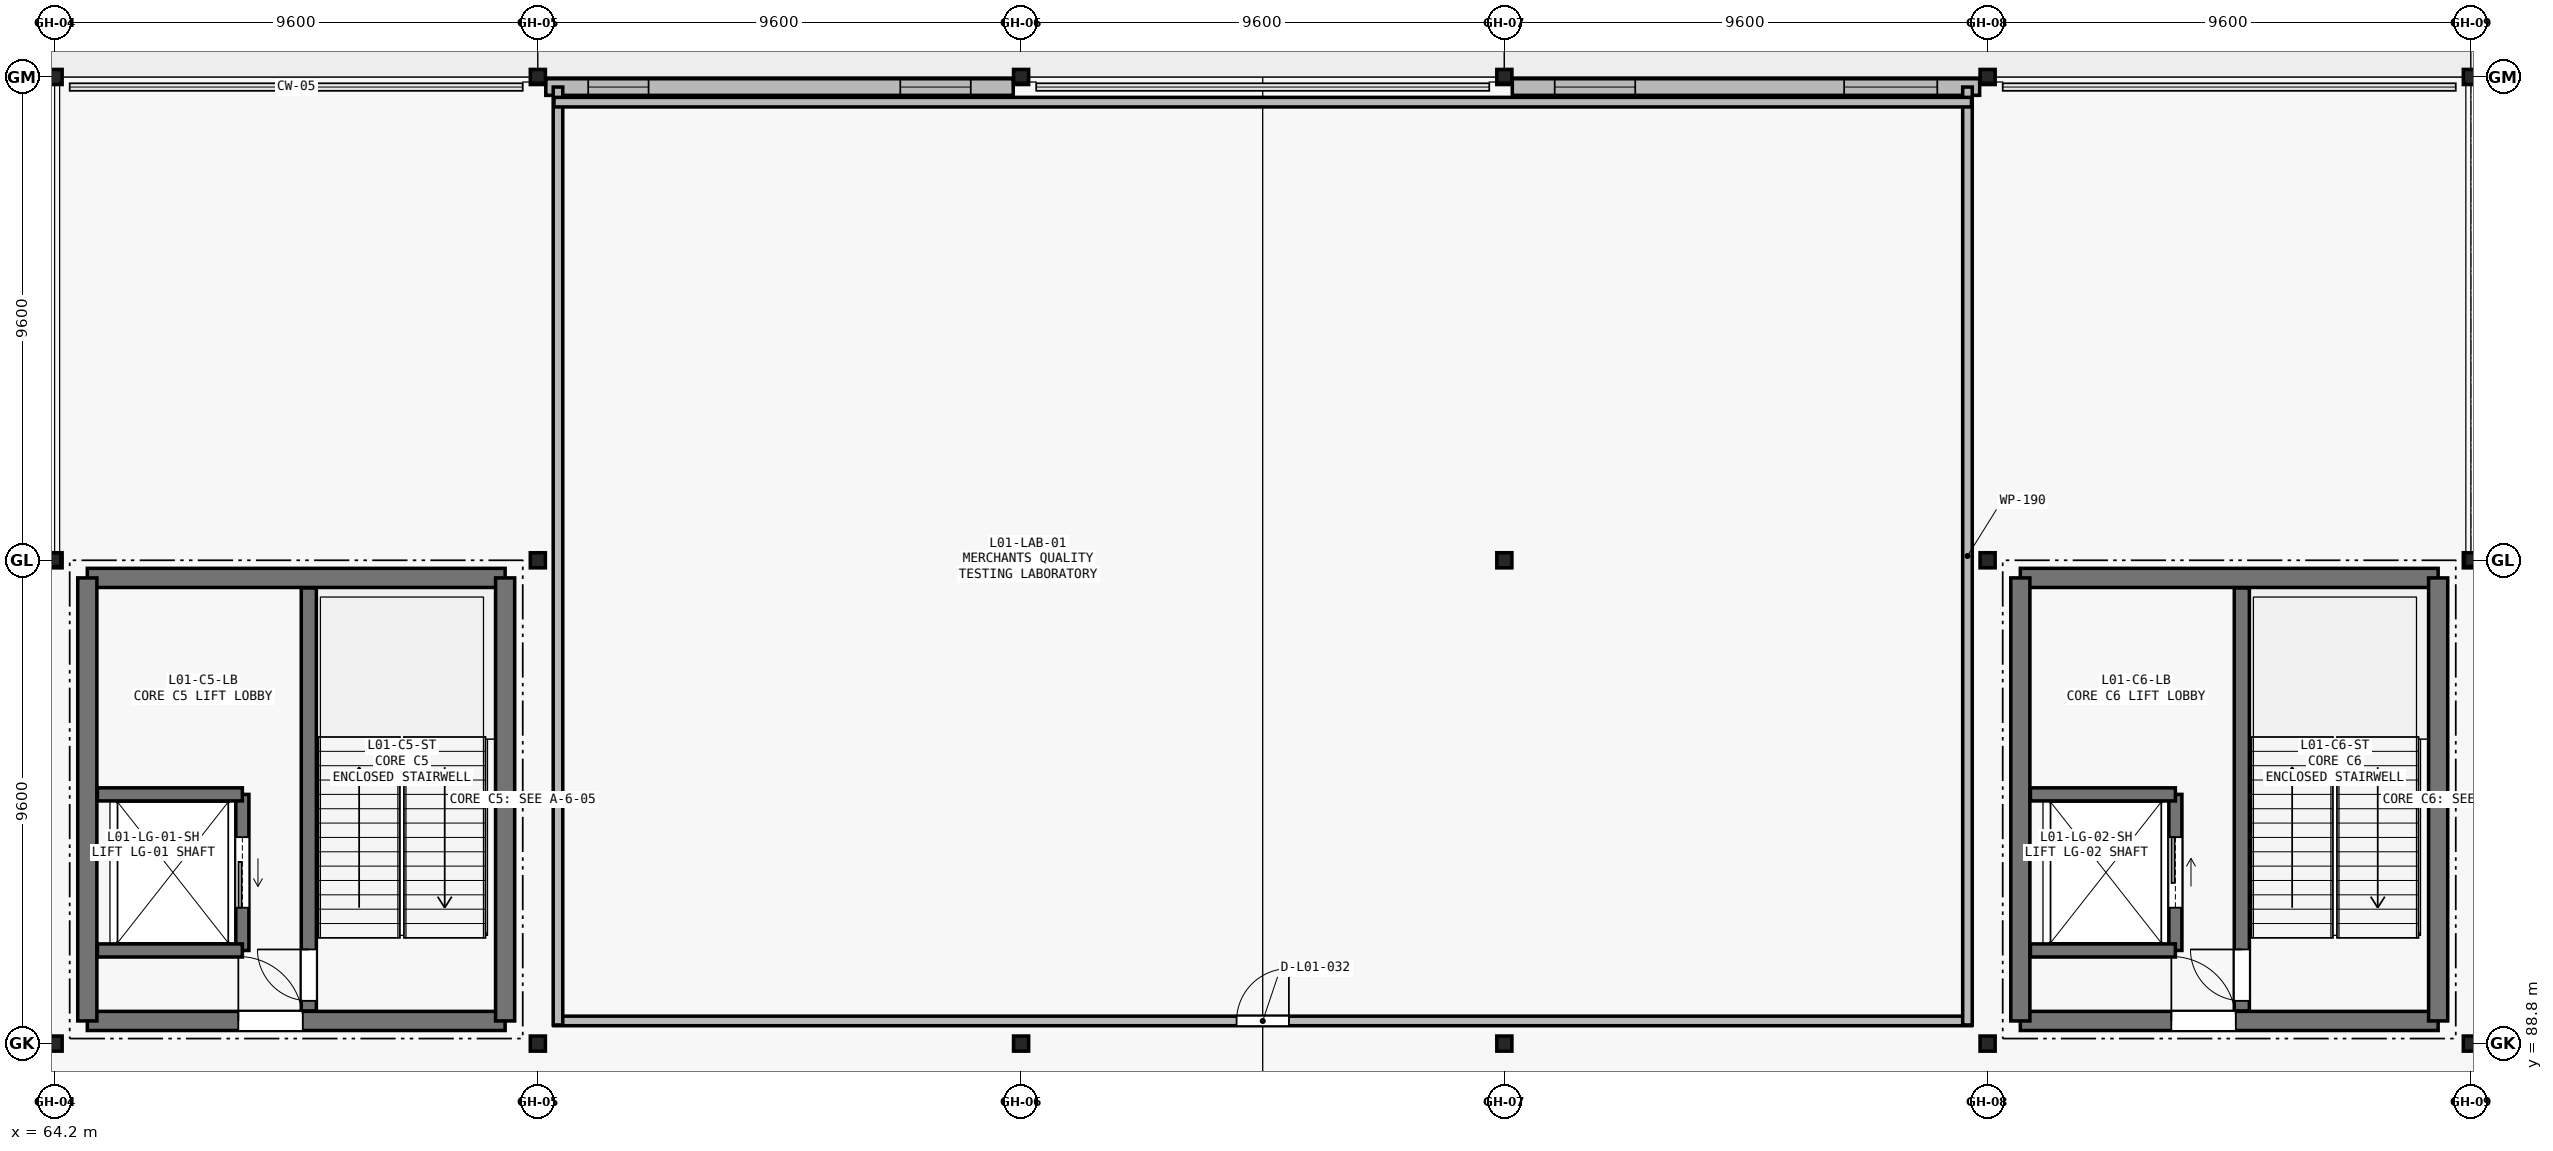
"""IFC4 building model, lengths in metres.
Left out: names, types, materials, properties, quantities, classifications, styles, units other than length and angle.
Written with IfcOpenShell. Run it as: python <this file> out.ifc"""

import sys

from ifc_helpers import new_model, si_unit, direction, frame, frame_2d, origin, origin_2d, place, context, subcontext, project, spatial, rectangle, hollow_rectangle, extrude, element, fill, save


model = new_model("IFC4")
c1 = context("Model", 3, precision=1e-05, world=origin(), true_north=direction((0.0, 1.0)))
c2 = subcontext(c1, "Body", "Model", "MODEL_VIEW")
j1 = project(units=[si_unit("LENGTHUNIT", "METRE"), si_unit("PLANEANGLEUNIT", "RADIAN")], contexts=[c1])
p1 = place(None, origin())
s1 = spatial("IfcSite", under=j1, at=p1, CompositionType="ELEMENT")
p2 = place(p1, origin())
s2 = spatial("IfcBuilding", under=s1, at=p2, CompositionType="ELEMENT")
p3 = place(p2, frame((0.0, 0.0, 6.0)))
s3 = spatial("IfcBuildingStorey", under=s2, at=p3, CompositionType="ELEMENT", Elevation=6.0)
for number, where, z_axis, x_axis in (
    (1, (64.2, 88.8, 0.0), (0.0, 0.0, 1.0), (1.0, 0.0, 0.0)),
    (2, (64.2, 98.4, 0.0), (0.0, 0.0, 1.0), (1.0, 0.0, 0.0)),
    (3, (64.2, 108.0, 0.0), (0.0, 0.0, 1.0), (1.0, 0.0, 0.0)),
    (4, (73.8, 88.8, 0.0), (0.0, 0.0, 1.0), (1.0, 0.0, 0.0)),
    (5, (73.8, 98.4, 0.0), (0.0, 0.0, 1.0), (1.0, 0.0, 0.0)),
    (6, (73.8, 108.0, 0.0), (0.0, 0.0, 1.0), (1.0, 0.0, 0.0)),
    (7, (83.4, 88.8, 0.0), (0.0, 0.0, 1.0), (1.0, 0.0, 0.0)),
    (8, (83.4, 98.4, 0.0), (0.0, 0.0, 1.0), (1.0, 0.0, 0.0)),
    (9, (83.4, 108.0, 0.0), (0.0, 0.0, 1.0), (1.0, 0.0, 0.0)),
    (10, (93.0, 88.8, 0.0), (0.0, 0.0, 1.0), (1.0, 0.0, 0.0)),
    (11, (93.0, 98.4, 0.0), (0.0, 0.0, 1.0), (1.0, 0.0, 0.0)),
    (12, (93.0, 108.0, 0.0), (0.0, 0.0, 1.0), (1.0, 0.0, 0.0)),
    (13, (102.6, 88.8, 0.0), (0.0, 0.0, 1.0), (1.0, 0.0, 0.0)),
    (14, (102.6, 98.4, 0.0), (0.0, 0.0, 1.0), (1.0, 0.0, 0.0)),
    (15, (102.6, 108.0, 0.0), (0.0, 0.0, 1.0), (1.0, 0.0, 0.0)),
    (16, (112.2, 88.8, 0.0), (0.0, 0.0, 1.0), (1.0, 0.0, 0.0)),
    (17, (112.2, 98.4, 0.0), (0.0, 0.0, 1.0), (1.0, 0.0, 0.0)),
    (18, (112.2, 108.0, 0.0), (0.0, 0.0, 1.0), (1.0, 0.0, 0.0)),
):
    element("IfcColumn", number, at=place(p3, frame(where, z_axis=z_axis, x_axis=x_axis)), inside=s3, PredefinedType="COLUMN", context=c2, shape_type="SweptSolid", body=[
        extrude(hollow_rectangle(XDim=0.3, YDim=0.3, WallThickness=0.01, InnerFilletRadius=0.01, OuterFilletRadius=0.016, at=origin_2d()), origin(), (0.0, 0.0, 1.0), 4.8),
    ])
p4 = place(p3, frame((73.958, 107.8, 0.0), z_axis=(0.0, 0.0, 1.0), x_axis=(1.0, 0.0, 0.0)))
e19 = element("IfcWall", 19, at=p4, inside=s3, PredefinedType="SOLIDWALL", context=c2, shape_type="SweptSolid", body=[
    extrude(rectangle(XDim=9.286, YDim=0.33, at=frame_2d((4.643, 0.0))), origin(), (0.0, 0.0, 1.0), 3.95),
])
p5 = place(p4, frame((0.842, 0.0, 0.95)))
e20 = element("IfcOpeningElement", 20, at=p5, cuts=e19, PredefinedType="OPENING", context=c2, shape_type="SweptSolid", body=[
    extrude(rectangle(XDim=1.2, YDim=1.95, at=frame_2d((0.6, 0.975))), frame((0.0, 0.175, 0.0), z_axis=(0.0, -1.0, 0.0), x_axis=(1.0, 0.0, 0.0)), (0.0, 0.0, 1.0), 0.35),
])
p6 = place(p4, frame((7.042, 0.0, 0.95)))
e21 = element("IfcOpeningElement", 21, at=p6, cuts=e19, PredefinedType="OPENING", context=c2, shape_type="SweptSolid", body=[
    extrude(rectangle(XDim=1.4, YDim=1.95, at=frame_2d((0.7, 0.975))), frame((0.0, 0.175, 0.0), z_axis=(0.0, -1.0, 0.0), x_axis=(1.0, 0.0, 0.0)), (0.0, 0.0, 1.0), 0.35),
])
p7 = place(p3, frame((93.158, 107.8, 0.0), z_axis=(0.0, 0.0, 1.0), x_axis=(1.0, 0.0, 0.0)))
e22 = element("IfcWall", 22, at=p7, inside=s3, PredefinedType="SOLIDWALL", context=c2, shape_type="SweptSolid", body=[
    extrude(rectangle(XDim=9.284, YDim=0.33, at=frame_2d((4.642, 0.0))), origin(), (0.0, 0.0, 1.0), 3.95),
])
p8 = place(p7, frame((0.842, 0.0, 0.95)))
e23 = element("IfcOpeningElement", 23, at=p8, cuts=e22, PredefinedType="OPENING", context=c2, shape_type="SweptSolid", body=[
    extrude(rectangle(XDim=1.6, YDim=1.95, at=frame_2d((0.8, 0.975))), frame((0.0, 0.175, 0.0), z_axis=(0.0, -1.0, 0.0), x_axis=(1.0, 0.0, 0.0)), (0.0, 0.0, 1.0), 0.35),
])
p9 = place(p7, frame((6.592, 0.0, 0.95)))
e24 = element("IfcOpeningElement", 24, at=p9, cuts=e22, PredefinedType="OPENING", context=c2, shape_type="SweptSolid", body=[
    extrude(rectangle(XDim=1.85, YDim=1.95, at=frame_2d((0.925, 0.975))), frame((0.0, 0.175, 0.0), z_axis=(0.0, -1.0, 0.0), x_axis=(1.0, 0.0, 0.0)), (0.0, 0.0, 1.0), 0.35),
])
p10 = place(p3, frame((64.85, 89.25, 0.0), z_axis=(0.0, 0.0, 1.0), x_axis=(1.0, 0.0, 0.0)))
e25 = element("IfcWall", 25, at=p10, inside=s3, PredefinedType="SHEAR", context=c2, shape_type="SweptSolid", body=[
    extrude(rectangle(XDim=8.3, YDim=0.38, at=frame_2d((4.15, 0.0))), origin(), (0.0, 0.0, 1.0), 4.8),
])
p11 = place(p10, frame((3.0, 0.0, 0.0)))
e26 = element("IfcOpeningElement", 26, at=p11, cuts=e25, PredefinedType="OPENING", context=c2, shape_type="SweptSolid", body=[
    extrude(rectangle(XDim=1.28, YDim=2.15, at=frame_2d((0.64, 1.075))), frame((0.0, 0.2, 0.0), z_axis=(0.0, -1.0, 0.0), x_axis=(1.0, 0.0, 0.0)), (0.0, 0.0, 1.0), 0.4),
])
p12 = place(p3, frame((73.15, 98.05, 0.0), z_axis=(0.0, 0.0, 1.0), x_axis=(-1.0, 0.0, 0.0)))
e27 = element("IfcWall", 27, at=p12, inside=s3, PredefinedType="SHEAR", context=c2, shape_type="SweptSolid", body=[
    extrude(rectangle(XDim=8.3, YDim=0.38, at=frame_2d((4.15, 0.0))), origin(), (0.0, 0.0, 1.0), 4.8),
])
for number, where, z_axis, x_axis in (
    (28, (64.85, 98.05, 0.0), (0.0, 0.0, 1.0), (0.0, -1.0, 0.0)),
    (29, (73.15, 89.25, 0.0), (0.0, 0.0, 1.0), (0.0, 1.0, 0.0)),
):
    element("IfcWall", number, at=place(p3, frame(where, z_axis=z_axis, x_axis=x_axis)), inside=s3, PredefinedType="SHEAR", context=c2, shape_type="SweptSolid", body=[
        extrude(rectangle(XDim=8.8, YDim=0.38, at=frame_2d((4.4, 0.0))), origin(), (0.0, 0.0, 1.0), 4.8),
    ])
p13 = place(p3, frame((69.25, 89.45, 0.0), z_axis=(0.0, 0.0, 1.0), x_axis=(0.0, 1.0, 0.0)))
e30 = element("IfcWall", 30, at=p13, inside=s3, PredefinedType="SHEAR", context=c2, shape_type="SweptSolid", body=[
    extrude(rectangle(XDim=8.4, YDim=0.3, at=frame_2d((4.2, 0.0))), origin(), (0.0, 0.0, 1.0), 4.8),
])
p14 = place(p13, frame((0.2, 0.0, 0.0)))
e31 = element("IfcOpeningElement", 31, at=p14, cuts=e30, PredefinedType="OPENING", context=c2, shape_type="SweptSolid", body=[
    extrude(rectangle(XDim=1.02, YDim=2.1, at=frame_2d((0.51, 1.05))), frame((0.0, 0.16, 0.0), z_axis=(0.0, -1.0, 0.0), x_axis=(1.0, 0.0, 0.0)), (0.0, 0.0, 1.0), 0.32),
])
p15 = place(p3, frame((67.93, 90.65, 0.0), z_axis=(0.0, 0.0, 1.0), x_axis=(0.0, 1.0, 0.0)))
e32 = element("IfcWall", 32, at=p15, inside=s3, PredefinedType="SHEAR", context=c2, shape_type="SweptSolid", body=[
    extrude(rectangle(XDim=3.1, YDim=0.26, at=frame_2d((1.55, 0.0))), origin(), (0.0, 0.0, 1.0), 4.8),
])
p16 = place(p15, frame((0.85, 0.0, 0.0)))
e33 = element("IfcOpeningElement", 33, at=p16, cuts=e32, PredefinedType="OPENING", context=c2, shape_type="SweptSolid", body=[
    extrude(rectangle(XDim=1.4, YDim=2.25, at=frame_2d((0.7, 1.125))), frame((0.0, 0.14, 0.0), z_axis=(0.0, -1.0, 0.0), x_axis=(1.0, 0.0, 0.0)), (0.0, 0.0, 1.0), 0.28),
])
for number, where, z_axis, x_axis in (
    (34, (65.05, 90.65, 0.0), (0.0, 0.0, 1.0), (1.0, 0.0, 0.0)),
    (35, (65.05, 93.75, 0.0), (0.0, 0.0, 1.0), (1.0, 0.0, 0.0)),
):
    element("IfcWall", number, at=place(p3, frame(where, z_axis=z_axis, x_axis=x_axis)), inside=s3, PredefinedType="SHEAR", context=c2, shape_type="SweptSolid", body=[
        extrude(rectangle(XDim=2.88, YDim=0.26, at=frame_2d((1.44, 0.0))), origin(), (0.0, 0.0, 1.0), 4.8),
    ])
p17 = place(p3, frame((103.25, 89.25, 0.0), z_axis=(0.0, 0.0, 1.0), x_axis=(1.0, 0.0, 0.0)))
e36 = element("IfcWall", 36, at=p17, inside=s3, PredefinedType="SHEAR", context=c2, shape_type="SweptSolid", body=[
    extrude(rectangle(XDim=8.3, YDim=0.38, at=frame_2d((4.15, 0.0))), origin(), (0.0, 0.0, 1.0), 4.8),
])
p18 = place(p17, frame((3.0, 0.0, 0.0)))
e37 = element("IfcOpeningElement", 37, at=p18, cuts=e36, PredefinedType="OPENING", context=c2, shape_type="SweptSolid", body=[
    extrude(rectangle(XDim=1.28, YDim=2.15, at=frame_2d((0.64, 1.075))), frame((0.0, 0.2, 0.0), z_axis=(0.0, -1.0, 0.0), x_axis=(1.0, 0.0, 0.0)), (0.0, 0.0, 1.0), 0.4),
])
p19 = place(p3, frame((111.55, 98.05, 0.0), z_axis=(0.0, 0.0, 1.0), x_axis=(-1.0, 0.0, 0.0)))
e38 = element("IfcWall", 38, at=p19, inside=s3, PredefinedType="SHEAR", context=c2, shape_type="SweptSolid", body=[
    extrude(rectangle(XDim=8.3, YDim=0.38, at=frame_2d((4.15, 0.0))), origin(), (0.0, 0.0, 1.0), 4.8),
])
for number, where, z_axis, x_axis in (
    (39, (103.25, 98.05, 0.0), (0.0, 0.0, 1.0), (0.0, -1.0, 0.0)),
    (40, (111.55, 89.25, 0.0), (0.0, 0.0, 1.0), (0.0, 1.0, 0.0)),
):
    element("IfcWall", number, at=place(p3, frame(where, z_axis=z_axis, x_axis=x_axis)), inside=s3, PredefinedType="SHEAR", context=c2, shape_type="SweptSolid", body=[
        extrude(rectangle(XDim=8.8, YDim=0.38, at=frame_2d((4.4, 0.0))), origin(), (0.0, 0.0, 1.0), 4.8),
    ])
p20 = place(p3, frame((107.65, 89.45, 0.0), z_axis=(0.0, 0.0, 1.0), x_axis=(0.0, 1.0, 0.0)))
e41 = element("IfcWall", 41, at=p20, inside=s3, PredefinedType="SHEAR", context=c2, shape_type="SweptSolid", body=[
    extrude(rectangle(XDim=8.4, YDim=0.3, at=frame_2d((4.2, 0.0))), origin(), (0.0, 0.0, 1.0), 4.8),
])
p21 = place(p20, frame((0.2, 0.0, 0.0)))
e42 = element("IfcOpeningElement", 42, at=p21, cuts=e41, PredefinedType="OPENING", context=c2, shape_type="SweptSolid", body=[
    extrude(rectangle(XDim=1.02, YDim=2.1, at=frame_2d((0.51, 1.05))), frame((0.0, 0.16, 0.0), z_axis=(0.0, -1.0, 0.0), x_axis=(1.0, 0.0, 0.0)), (0.0, 0.0, 1.0), 0.32),
])
p22 = place(p3, frame((106.33, 90.65, 0.0), z_axis=(0.0, 0.0, 1.0), x_axis=(0.0, 1.0, 0.0)))
e43 = element("IfcWall", 43, at=p22, inside=s3, PredefinedType="SHEAR", context=c2, shape_type="SweptSolid", body=[
    extrude(rectangle(XDim=3.1, YDim=0.26, at=frame_2d((1.55, 0.0))), origin(), (0.0, 0.0, 1.0), 4.8),
])
p23 = place(p22, frame((0.85, 0.0, 0.0)))
e44 = element("IfcOpeningElement", 44, at=p23, cuts=e43, PredefinedType="OPENING", context=c2, shape_type="SweptSolid", body=[
    extrude(rectangle(XDim=1.4, YDim=2.25, at=frame_2d((0.7, 1.125))), frame((0.0, 0.14, 0.0), z_axis=(0.0, -1.0, 0.0), x_axis=(1.0, 0.0, 0.0)), (0.0, 0.0, 1.0), 0.28),
])
for number, where, z_axis, x_axis in (
    (45, (103.45, 90.65, 0.0), (0.0, 0.0, 1.0), (1.0, 0.0, 0.0)),
    (46, (103.45, 93.75, 0.0), (0.0, 0.0, 1.0), (1.0, 0.0, 0.0)),
):
    element("IfcWall", number, at=place(p3, frame(where, z_axis=z_axis, x_axis=x_axis)), inside=s3, PredefinedType="SHEAR", context=c2, shape_type="SweptSolid", body=[
        extrude(rectangle(XDim=2.88, YDim=0.26, at=frame_2d((1.44, 0.0))), origin(), (0.0, 0.0, 1.0), 4.8),
    ])
p24 = place(p3, frame((74.12, 89.25, 0.0), z_axis=(0.0, 0.0, 1.0), x_axis=(1.0, 0.0, 0.0)))
e47 = element("IfcWall", 47, at=p24, inside=s3, PredefinedType="PARTITIONING", context=c2, shape_type="SweptSolid", body=[
    extrude(rectangle(XDim=28.16, YDim=0.19, at=frame_2d((14.08, 0.0))), origin(), (0.0, 0.0, 1.0), 4.32),
])
p25 = place(p24, frame((13.56, 0.0, 0.0)))
e48 = element("IfcOpeningElement", 48, at=p25, cuts=e47, PredefinedType="OPENING", context=c2, shape_type="SweptSolid", body=[
    extrude(rectangle(XDim=1.04, YDim=2.26, at=frame_2d((0.52, 1.13))), frame((0.0, 0.105, 0.0), z_axis=(0.0, -1.0, 0.0), x_axis=(1.0, 0.0, 0.0)), (0.0, 0.0, 1.0), 0.21),
])
for number, where, z_axis, x_axis in (
    (49, (102.2, 89.17, 0.0), (0.0, 0.0, 1.0), (0.0, 1.0, 0.0)),
    (50, (74.2, 107.8, 0.0), (0.0, 0.0, 1.0), (0.0, -1.0, 0.0)),
):
    element("IfcWall", number, at=place(p3, frame(where, z_axis=z_axis, x_axis=x_axis)), inside=s3, PredefinedType="PARTITIONING", context=c2, shape_type="SweptSolid", body=[
        extrude(rectangle(XDim=18.63, YDim=0.19, at=frame_2d((9.315, 0.0))), origin(), (0.0, 0.0, 1.0), 4.32),
    ])
p26 = place(p3, frame((102.28, 107.5, 0.0), z_axis=(0.0, 0.0, 1.0), x_axis=(-1.0, 0.0, 0.0)))
e51 = element("IfcWall", 51, at=p26, inside=s3, PredefinedType="PARTITIONING", context=c2, shape_type="SweptSolid", body=[
    extrude(rectangle(XDim=28.16, YDim=0.19, at=frame_2d((14.08, 0.0))), origin(), (0.0, 0.0, 1.0), 4.32),
])
p27 = place(p5, origin())
e52 = element("IfcWindow", 52, at=p27, inside=s3, PartitioningType="SINGLE_PANEL", PredefinedType="WINDOW", context=c2, shape_type="SweptSolid", body=[
    extrude(rectangle(XDim=1.2, YDim=1.95, at=frame_2d((0.6, 0.975))), frame((0.0, 0.03, 0.0), z_axis=(0.0, -1.0, 0.0), x_axis=(1.0, 0.0, 0.0)), (0.0, 0.0, 1.0), 0.06),
])
fill(e20, e52)
p28 = place(p6, origin())
e53 = element("IfcWindow", 53, at=p28, inside=s3, PartitioningType="SINGLE_PANEL", PredefinedType="WINDOW", context=c2, shape_type="SweptSolid", body=[
    extrude(rectangle(XDim=1.4, YDim=1.95, at=frame_2d((0.7, 0.975))), frame((0.0, 0.03, 0.0), z_axis=(0.0, -1.0, 0.0), x_axis=(1.0, 0.0, 0.0)), (0.0, 0.0, 1.0), 0.06),
])
fill(e21, e53)
p29 = place(p8, origin())
e54 = element("IfcWindow", 54, at=p29, inside=s3, PartitioningType="SINGLE_PANEL", PredefinedType="WINDOW", context=c2, shape_type="SweptSolid", body=[
    extrude(rectangle(XDim=1.6, YDim=1.95, at=frame_2d((0.8, 0.975))), frame((0.0, 0.03, 0.0), z_axis=(0.0, -1.0, 0.0), x_axis=(1.0, 0.0, 0.0)), (0.0, 0.0, 1.0), 0.06),
])
fill(e23, e54)
p30 = place(p9, origin())
e55 = element("IfcWindow", 55, at=p30, inside=s3, PartitioningType="SINGLE_PANEL", PredefinedType="WINDOW", context=c2, shape_type="SweptSolid", body=[
    extrude(rectangle(XDim=1.85, YDim=1.95, at=frame_2d((0.925, 0.975))), frame((0.0, 0.03, 0.0), z_axis=(0.0, -1.0, 0.0), x_axis=(1.0, 0.0, 0.0)), (0.0, 0.0, 1.0), 0.06),
])
fill(e24, e55)
p31 = place(p11, origin())
e56 = element("IfcDoor", 56, at=p31, inside=s3, OperationType="SINGLE_SWING_LEFT", PredefinedType="DOOR", context=c2, shape_type="SweptSolid", body=[
    extrude(rectangle(XDim=1.28, YDim=2.15, at=frame_2d((0.64, 1.075))), frame((0.0, 0.025, 0.0), z_axis=(0.0, -1.0, 0.0), x_axis=(1.0, 0.0, 0.0)), (0.0, 0.0, 1.0), 0.05),
])
fill(e26, e56)
p32 = place(p14, origin())
e57 = element("IfcDoor", 57, at=p32, inside=s3, OperationType="SINGLE_SWING_RIGHT", PredefinedType="DOOR", context=c2, shape_type="SweptSolid", body=[
    extrude(rectangle(XDim=1.02, YDim=2.1, at=frame_2d((0.51, 1.05))), frame((0.0, 0.025, 0.0), z_axis=(0.0, -1.0, 0.0), x_axis=(1.0, 0.0, 0.0)), (0.0, 0.0, 1.0), 0.05),
])
fill(e31, e57)
p33 = place(p16, origin())
e58 = element("IfcDoor", 58, at=p33, inside=s3, OperationType="SLIDING_TO_LEFT", PredefinedType="DOOR", context=c2, shape_type="SweptSolid", body=[
    extrude(rectangle(XDim=1.4, YDim=2.25, at=frame_2d((0.7, 1.125))), frame((0.0, 0.025, 0.0), z_axis=(0.0, -1.0, 0.0), x_axis=(1.0, 0.0, 0.0)), (0.0, 0.0, 1.0), 0.05),
])
fill(e33, e58)
p34 = place(p18, origin())
e59 = element("IfcDoor", 59, at=p34, inside=s3, OperationType="SINGLE_SWING_LEFT", PredefinedType="DOOR", context=c2, shape_type="SweptSolid", body=[
    extrude(rectangle(XDim=1.28, YDim=2.15, at=frame_2d((0.64, 1.075))), frame((0.0, 0.025, 0.0), z_axis=(0.0, -1.0, 0.0), x_axis=(1.0, 0.0, 0.0)), (0.0, 0.0, 1.0), 0.05),
])
fill(e37, e59)
p35 = place(p21, origin())
e60 = element("IfcDoor", 60, at=p35, inside=s3, OperationType="SINGLE_SWING_RIGHT", PredefinedType="DOOR", context=c2, shape_type="SweptSolid", body=[
    extrude(rectangle(XDim=1.02, YDim=2.1, at=frame_2d((0.51, 1.05))), frame((0.0, 0.025, 0.0), z_axis=(0.0, -1.0, 0.0), x_axis=(1.0, 0.0, 0.0)), (0.0, 0.0, 1.0), 0.05),
])
fill(e42, e60)
p36 = place(p23, origin())
e61 = element("IfcDoor", 61, at=p36, inside=s3, OperationType="SLIDING_TO_RIGHT", PredefinedType="DOOR", context=c2, shape_type="SweptSolid", body=[
    extrude(rectangle(XDim=1.4, YDim=2.25, at=frame_2d((0.7, 1.125))), frame((0.0, 0.025, 0.0), z_axis=(0.0, -1.0, 0.0), x_axis=(1.0, 0.0, 0.0)), (0.0, 0.0, 1.0), 0.05),
])
fill(e44, e61)
p37 = place(p25, origin())
e62 = element("IfcDoor", 62, at=p37, inside=s3, OperationType="SINGLE_SWING_RIGHT", PredefinedType="DOOR", context=c2, shape_type="SweptSolid", body=[
    extrude(rectangle(XDim=1.04, YDim=2.26, at=frame_2d((0.52, 1.13))), frame((0.0, 0.025, 0.0), z_axis=(0.0, -1.0, 0.0), x_axis=(1.0, 0.0, 0.0)), (0.0, 0.0, 1.0), 0.05),
])
fill(e48, e62)
save(model, sys.argv[1])
